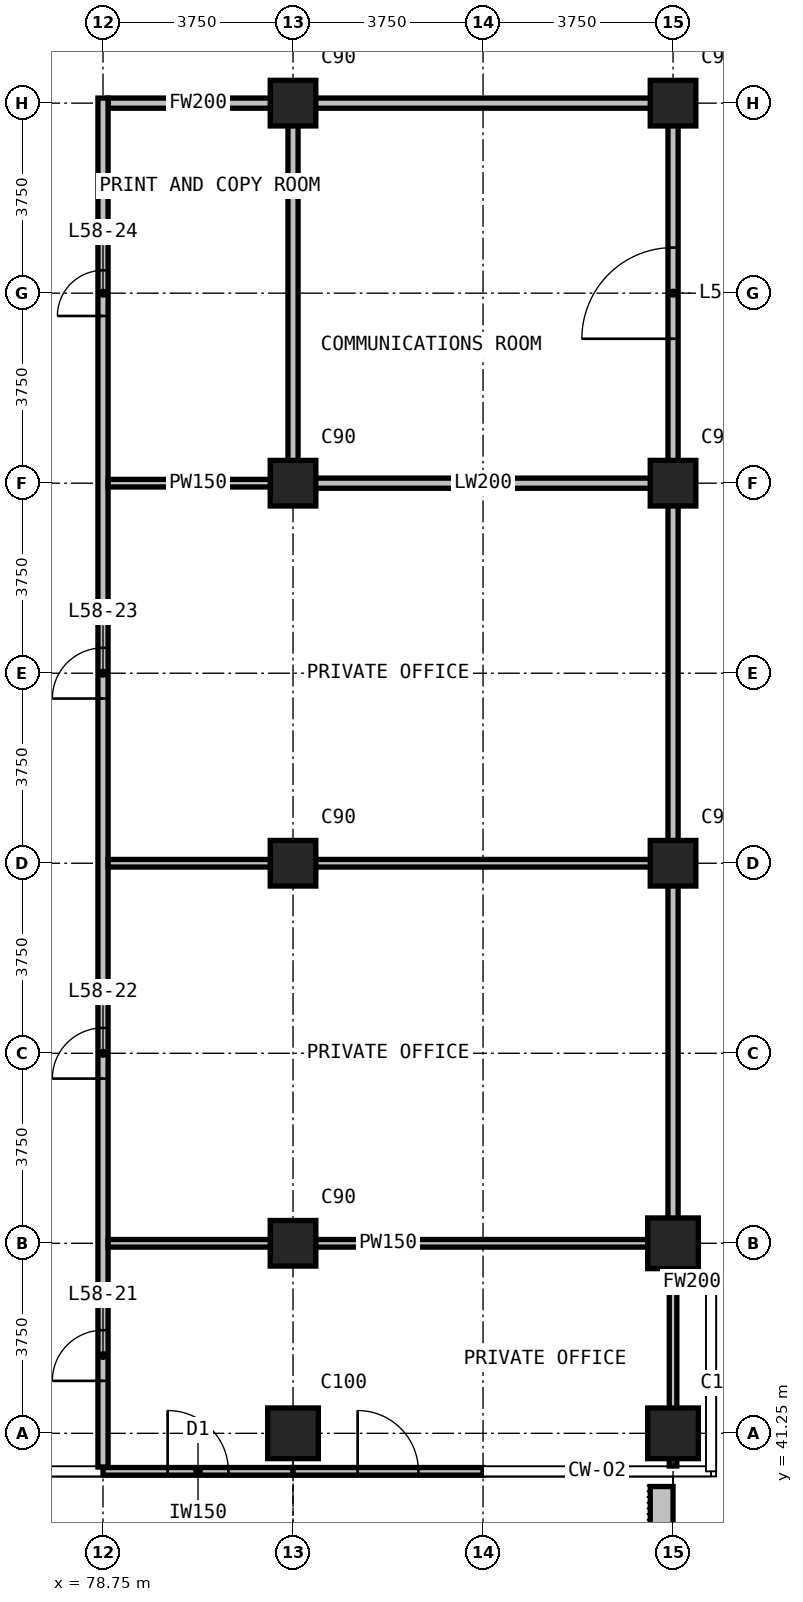
"""IFC4 building model, lengths in metres.
Left out: names, types, materials, properties, quantities, classifications, styles, units other than length and angle.
Written with IfcOpenShell. Run it as: python <this file> out.ifc"""

import sys

from ifc_helpers import new_model, si_unit, direction, frame, frame_2d, origin, origin_2d, place, context, subcontext, project, spatial, rectangle, extrude, element, fill, save


model = new_model("IFC4")
c1 = context("Model", 3, precision=1e-05, world=origin(), true_north=direction((0.0, 1.0)))
c2 = subcontext(c1, "Body", "Model", "MODEL_VIEW")
j1 = project(units=[si_unit("LENGTHUNIT", "METRE"), si_unit("PLANEANGLEUNIT", "RADIAN")], contexts=[c1])
p1 = place(None, origin())
s1 = spatial("IfcSite", under=j1, at=p1, CompositionType="ELEMENT")
p2 = place(p1, origin())
s2 = spatial("IfcBuilding", under=s1, at=p2, CompositionType="ELEMENT")
p3 = place(p2, frame((0.0, 0.0, 224.7)))
s3 = spatial("IfcBuildingStorey", under=s2, at=p3, CompositionType="ELEMENT", Elevation=224.7)
p4 = place(p3, frame((82.5, 41.25, 0.0), z_axis=(0.0, 0.0, 1.0), x_axis=(1.0, 0.0, 0.0)))
e1 = element("IfcColumn", 1, at=p4, inside=s3, PredefinedType="COLUMN", context=c2, shape_type="SweptSolid", body=[
    extrude(rectangle(XDim=1.0, YDim=1.0, at=origin_2d()), origin(), (0.0, 0.0, 1.0), 3.6),
])
for number, where, z_axis, x_axis in (
    (2, (82.5, 45.0, 0.0), (0.0, 0.0, 1.0), (1.0, 0.0, 0.0)),
    (3, (82.5, 52.5, 0.0), (0.0, 0.0, 1.0), (1.0, 0.0, 0.0)),
    (4, (82.5, 60.0, 0.0), (0.0, 0.0, 1.0), (1.0, 0.0, 0.0)),
    (5, (82.5, 67.5, 0.0), (0.0, 0.0, 1.0), (1.0, 0.0, 0.0)),
):
    element("IfcColumn", number, at=place(p3, frame(where, z_axis=z_axis, x_axis=x_axis)), inside=s3, PredefinedType="COLUMN", context=c2, shape_type="SweptSolid", body=[
        extrude(rectangle(XDim=0.9, YDim=0.9, at=origin_2d()), origin(), (0.0, 0.0, 1.0), 3.6),
    ])
for number, where, z_axis, x_axis in (
    (6, (90.0, 41.25, 0.0), (0.0, 0.0, 1.0), (1.0, 0.0, 0.0)),
    (7, (90.0, 45.0, 0.0), (0.0, 0.0, 1.0), (1.0, 0.0, 0.0)),
):
    element("IfcColumn", number, at=place(p3, frame(where, z_axis=z_axis, x_axis=x_axis)), inside=s3, PredefinedType="COLUMN", context=c2, shape_type="SweptSolid", body=[
        extrude(rectangle(XDim=1.0, YDim=1.0, at=origin_2d()), origin(), (0.0, 0.0, 1.0), 3.6),
    ])
for number, where, z_axis, x_axis in (
    (8, (90.0, 52.5, 0.0), (0.0, 0.0, 1.0), (1.0, 0.0, 0.0)),
    (9, (90.0, 60.0, 0.0), (0.0, 0.0, 1.0), (1.0, 0.0, 0.0)),
    (10, (90.0, 67.5, 0.0), (0.0, 0.0, 1.0), (1.0, 0.0, 0.0)),
):
    element("IfcColumn", number, at=place(p3, frame(where, z_axis=z_axis, x_axis=x_axis)), inside=s3, PredefinedType="COLUMN", context=c2, shape_type="SweptSolid", body=[
        extrude(rectangle(XDim=0.9, YDim=0.9, at=origin_2d()), origin(), (0.0, 0.0, 1.0), 3.6),
    ])
p5 = place(p3, frame((78.75, 40.5, 0.0), z_axis=(0.0, 0.0, 1.0), x_axis=(1.0, 0.0, 0.0)))
e11 = element("IfcWall", 11, at=p5, inside=s3, PredefinedType="SOLIDWALL", context=c2, shape_type="SweptSolid", body=[
    extrude(rectangle(XDim=3.75, YDim=0.15, at=frame_2d((1.875, 0.0))), origin(), (0.0, 0.0, 1.0), 3.3),
])
p6 = place(p5, frame((1.275, 0.0, 0.0)))
e12 = element("IfcOpeningElement", 12, at=p6, cuts=e11, PredefinedType="OPENING", context=c2, shape_type="SweptSolid", body=[
    extrude(rectangle(XDim=1.2, YDim=2.4, at=frame_2d((0.6, 1.2))), frame((0.0, 0.085, 0.0), z_axis=(0.0, -1.0, 0.0), x_axis=(1.0, 0.0, 0.0)), (0.0, 0.0, 1.0), 0.17),
])
p7 = place(p3, frame((82.5, 40.5, 0.0), z_axis=(0.0, 0.0, 1.0), x_axis=(1.0, 0.0, 0.0)))
e13 = element("IfcWall", 13, at=p7, inside=s3, PredefinedType="SOLIDWALL", context=c2, shape_type="SweptSolid", body=[
    extrude(rectangle(XDim=3.75, YDim=0.15, at=frame_2d((1.875, 0.0))), origin(), (0.0, 0.0, 1.0), 3.3),
])
p8 = place(p7, frame((1.275, 0.0, 0.0)))
e14 = element("IfcOpeningElement", 14, at=p8, cuts=e13, PredefinedType="OPENING", context=c2, shape_type="SweptSolid", body=[
    extrude(rectangle(XDim=1.2, YDim=2.4, at=frame_2d((0.6, 1.2))), frame((0.0, 0.085, 0.0), z_axis=(0.0, -1.0, 0.0), x_axis=(1.0, 0.0, 0.0)), (0.0, 0.0, 1.0), 0.17),
])
p9 = place(p3, frame((89.775, 40.2, 0.0), z_axis=(0.0, 0.0, 1.0), x_axis=(0.0, -1.0, 0.0)))
e15 = element("IfcWall", 15, at=p9, inside=s3, PredefinedType="USERDEFINED", context=c2, shape_type="SweptSolid", body=[
    extrude(rectangle(XDim=2.35, YDim=0.45, at=frame_2d((1.175, 0.0))), origin(), (0.0, 0.0, 1.0), 1.1),
])
for number, where, z_axis, x_axis in (
    (16, (82.6, 60.0, 0.0), (0.0, 0.0, 1.0), (1.0, 0.0, 0.0)),
    (17, (82.6, 67.5, 0.0), (0.0, 0.0, 1.0), (1.0, 0.0, 0.0)),
):
    element("IfcWall", number, at=place(p3, frame(where, z_axis=z_axis, x_axis=x_axis)), inside=s3, PredefinedType="PARTITIONING", context=c2, shape_type="SweptSolid", body=[
        extrude(rectangle(XDim=7.3, YDim=0.2, at=frame_2d((3.65, 0.0))), origin(), (0.0, 0.0, 1.0), 3.3),
    ])
p10 = place(p3, frame((82.5, 59.9, 0.0), z_axis=(0.0, 0.0, 1.0), x_axis=(0.0, 1.0, 0.0)))
e18 = element("IfcWall", 18, at=p10, inside=s3, PredefinedType="PARTITIONING", context=c2, shape_type="SweptSolid", body=[
    extrude(rectangle(XDim=7.7, YDim=0.2, at=frame_2d((3.85, 0.0))), origin(), (0.0, 0.0, 1.0), 3.3),
])
p11 = place(p3, frame((90.0, 59.9, 0.0), z_axis=(0.0, 0.0, 1.0), x_axis=(0.0, 1.0, 0.0)))
e19 = element("IfcWall", 19, at=p11, inside=s3, PredefinedType="PARTITIONING", context=c2, shape_type="SweptSolid", body=[
    extrude(rectangle(XDim=7.7, YDim=0.2, at=frame_2d((3.85, 0.0))), origin(), (0.0, 0.0, 1.0), 3.3),
])
p12 = place(p11, frame((2.95, 0.0, 0.0)))
e20 = element("IfcOpeningElement", 20, at=p12, cuts=e19, PredefinedType="OPENING", context=c2, shape_type="SweptSolid", body=[
    extrude(rectangle(XDim=1.8, YDim=2.4, at=frame_2d((0.9, 1.2))), frame((0.0, 0.11, 0.0), z_axis=(0.0, -1.0, 0.0), x_axis=(1.0, 0.0, 0.0)), (0.0, 0.0, 1.0), 0.22),
])
p13 = place(p3, frame((90.1, 44.235, 0.0), z_axis=(0.0, 0.0, 1.0), x_axis=(1.0, 0.0, 0.0)))
e21 = element("IfcWall", 21, at=p13, inside=s3, PredefinedType="PARTITIONING", context=c2, shape_type="SweptSolid", body=[
    extrude(rectangle(XDim=0.545, YDim=0.2, at=frame_2d((0.272, 0.0))), origin(), (0.0, 0.0, 1.0), 3.3),
])
p14 = place(p3, frame((78.85, 67.5, 0.0), z_axis=(0.0, 0.0, 1.0), x_axis=(1.0, 0.0, 0.0)))
e22 = element("IfcWall", 22, at=p14, inside=s3, PredefinedType="PARTITIONING", context=c2, shape_type="SweptSolid", body=[
    extrude(rectangle(XDim=3.55, YDim=0.2, at=frame_2d((1.775, 0.0))), origin(), (0.0, 0.0, 1.0), 3.3),
])
p15 = place(p3, frame((78.75, 40.585, 0.0), z_axis=(0.0, 0.0, 1.0), x_axis=(0.0, 1.0, 0.0)))
e23 = element("IfcWall", 23, at=p15, inside=s3, PredefinedType="PARTITIONING", context=c2, shape_type="SweptSolid", body=[
    extrude(rectangle(XDim=27.015, YDim=0.2, at=frame_2d((13.508, 0.0))), origin(), (0.0, 0.0, 1.0), 3.3),
])
p16 = place(p15, frame((1.7, 0.0, 0.0)))
e24 = element("IfcOpeningElement", 24, at=p16, cuts=e23, PredefinedType="OPENING", context=c2, shape_type="SweptSolid", body=[
    extrude(rectangle(XDim=1.0, YDim=2.2, at=frame_2d((0.5, 1.1))), frame((0.0, 0.11, 0.0), z_axis=(0.0, -1.0, 0.0), x_axis=(1.0, 0.0, 0.0)), (0.0, 0.0, 1.0), 0.22),
])
p17 = place(p15, frame((7.665, 0.0, 0.0)))
e25 = element("IfcOpeningElement", 25, at=p17, cuts=e23, PredefinedType="OPENING", context=c2, shape_type="SweptSolid", body=[
    extrude(rectangle(XDim=1.0, YDim=2.2, at=frame_2d((0.5, 1.1))), frame((0.0, 0.11, 0.0), z_axis=(0.0, -1.0, 0.0), x_axis=(1.0, 0.0, 0.0)), (0.0, 0.0, 1.0), 0.22),
])
p18 = place(p15, frame((15.165, 0.0, 0.0)))
e26 = element("IfcOpeningElement", 26, at=p18, cuts=e23, PredefinedType="OPENING", context=c2, shape_type="SweptSolid", body=[
    extrude(rectangle(XDim=1.0, YDim=2.2, at=frame_2d((0.5, 1.1))), frame((0.0, 0.11, 0.0), z_axis=(0.0, -1.0, 0.0), x_axis=(1.0, 0.0, 0.0)), (0.0, 0.0, 1.0), 0.22),
])
p19 = place(p15, frame((22.715, 0.0, 0.0)))
e27 = element("IfcOpeningElement", 27, at=p19, cuts=e23, PredefinedType="OPENING", context=c2, shape_type="SweptSolid", body=[
    extrude(rectangle(XDim=0.9, YDim=2.2, at=frame_2d((0.45, 1.1))), frame((0.0, 0.11, 0.0), z_axis=(0.0, -1.0, 0.0), x_axis=(1.0, 0.0, 0.0)), (0.0, 0.0, 1.0), 0.22),
])
p20 = place(p3, frame((90.0, 44.135, 0.0), z_axis=(0.0, 0.0, 1.0), x_axis=(0.0, 1.0, 0.0)))
e28 = element("IfcWall", 28, at=p20, inside=s3, PredefinedType="PARTITIONING", context=c2, shape_type="SweptSolid", body=[
    extrude(rectangle(XDim=15.865, YDim=0.2, at=frame_2d((7.933, 0.0))), origin(), (0.0, 0.0, 1.0), 3.3),
])
for number, where, z_axis, x_axis in (
    (29, (78.85, 45.0, 0.0), (0.0, 0.0, 1.0), (1.0, 0.0, 0.0)),
    (30, (78.85, 52.5, 0.0), (0.0, 0.0, 1.0), (1.0, 0.0, 0.0)),
):
    element("IfcWall", number, at=place(p3, frame(where, z_axis=z_axis, x_axis=x_axis)), inside=s3, PredefinedType="PARTITIONING", context=c2, shape_type="SweptSolid", body=[
        extrude(rectangle(XDim=11.05, YDim=0.15, at=frame_2d((5.525, 0.0))), origin(), (0.0, 0.0, 1.0), 3.3),
    ])
p21 = place(p3, frame((78.85, 60.0, 0.0), z_axis=(0.0, 0.0, 1.0), x_axis=(1.0, 0.0, 0.0)))
e31 = element("IfcWall", 31, at=p21, inside=s3, PredefinedType="PARTITIONING", context=c2, shape_type="SweptSolid", body=[
    extrude(rectangle(XDim=3.55, YDim=0.15, at=frame_2d((1.775, 0.0))), origin(), (0.0, 0.0, 1.0), 3.3),
])
p22 = place(p3, frame((90.0, 40.605, 0.0), z_axis=(0.0, 0.0, 1.0), x_axis=(0.0, 1.0, 0.0)))
e32 = element("IfcWall", 32, at=p22, inside=s3, PredefinedType="PARTITIONING", context=c2, shape_type="SweptSolid", body=[
    extrude(rectangle(XDim=3.6, YDim=0.15, at=frame_2d((1.8, 0.0))), origin(), (0.0, 0.0, 1.0), 3.3),
])
p23 = place(p6, origin())
e33 = element("IfcDoor", 33, at=p23, inside=s3, OperationType="SINGLE_SWING_LEFT", PredefinedType="DOOR", context=c2, shape_type="SweptSolid", body=[
    extrude(rectangle(XDim=1.2, YDim=2.4, at=frame_2d((0.6, 1.2))), frame((0.0, 0.025, 0.0), z_axis=(0.0, -1.0, 0.0), x_axis=(1.0, 0.0, 0.0)), (0.0, 0.0, 1.0), 0.05),
])
fill(e12, e33)
p24 = place(p8, origin())
e34 = element("IfcDoor", 34, at=p24, inside=s3, OperationType="SINGLE_SWING_LEFT", PredefinedType="DOOR", context=c2, shape_type="SweptSolid", body=[
    extrude(rectangle(XDim=1.2, YDim=2.4, at=frame_2d((0.6, 1.2))), frame((0.0, 0.025, 0.0), z_axis=(0.0, -1.0, 0.0), x_axis=(1.0, 0.0, 0.0)), (0.0, 0.0, 1.0), 0.05),
])
fill(e14, e34)
p25 = place(p16, origin())
e35 = element("IfcDoor", 35, at=p25, inside=s3, OperationType="SINGLE_SWING_LEFT", PredefinedType="DOOR", context=c2, shape_type="SweptSolid", body=[
    extrude(rectangle(XDim=1.0, YDim=2.2, at=frame_2d((0.5, 1.1))), frame((0.0, 0.025, 0.0), z_axis=(0.0, -1.0, 0.0), x_axis=(1.0, 0.0, 0.0)), (0.0, 0.0, 1.0), 0.05),
])
fill(e24, e35)
p26 = place(p17, origin())
e36 = element("IfcDoor", 36, at=p26, inside=s3, OperationType="SINGLE_SWING_LEFT", PredefinedType="DOOR", context=c2, shape_type="SweptSolid", body=[
    extrude(rectangle(XDim=1.0, YDim=2.2, at=frame_2d((0.5, 1.1))), frame((0.0, 0.025, 0.0), z_axis=(0.0, -1.0, 0.0), x_axis=(1.0, 0.0, 0.0)), (0.0, 0.0, 1.0), 0.05),
])
fill(e25, e36)
p27 = place(p18, origin())
e37 = element("IfcDoor", 37, at=p27, inside=s3, OperationType="SINGLE_SWING_RIGHT", PredefinedType="DOOR", context=c2, shape_type="SweptSolid", body=[
    extrude(rectangle(XDim=1.0, YDim=2.2, at=frame_2d((0.5, 1.1))), frame((0.0, 0.025, 0.0), z_axis=(0.0, -1.0, 0.0), x_axis=(1.0, 0.0, 0.0)), (0.0, 0.0, 1.0), 0.05),
])
fill(e26, e37)
p28 = place(p19, origin())
e38 = element("IfcDoor", 38, at=p28, inside=s3, OperationType="SINGLE_SWING_LEFT", PredefinedType="DOOR", context=c2, shape_type="SweptSolid", body=[
    extrude(rectangle(XDim=0.9, YDim=2.2, at=frame_2d((0.45, 1.1))), frame((0.0, 0.025, 0.0), z_axis=(0.0, -1.0, 0.0), x_axis=(1.0, 0.0, 0.0)), (0.0, 0.0, 1.0), 0.05),
])
fill(e27, e38)
p29 = place(p12, origin())
e39 = element("IfcDoor", 39, at=p29, inside=s3, OperationType="DOUBLE_DOOR_SINGLE_SWING", PredefinedType="DOOR", context=c2, shape_type="SweptSolid", body=[
    extrude(rectangle(XDim=1.8, YDim=2.4, at=frame_2d((0.9, 1.2))), frame((0.0, 0.025, 0.0), z_axis=(0.0, -1.0, 0.0), x_axis=(1.0, 0.0, 0.0)), (0.0, 0.0, 1.0), 0.05),
])
fill(e20, e39)
save(model, sys.argv[1])
